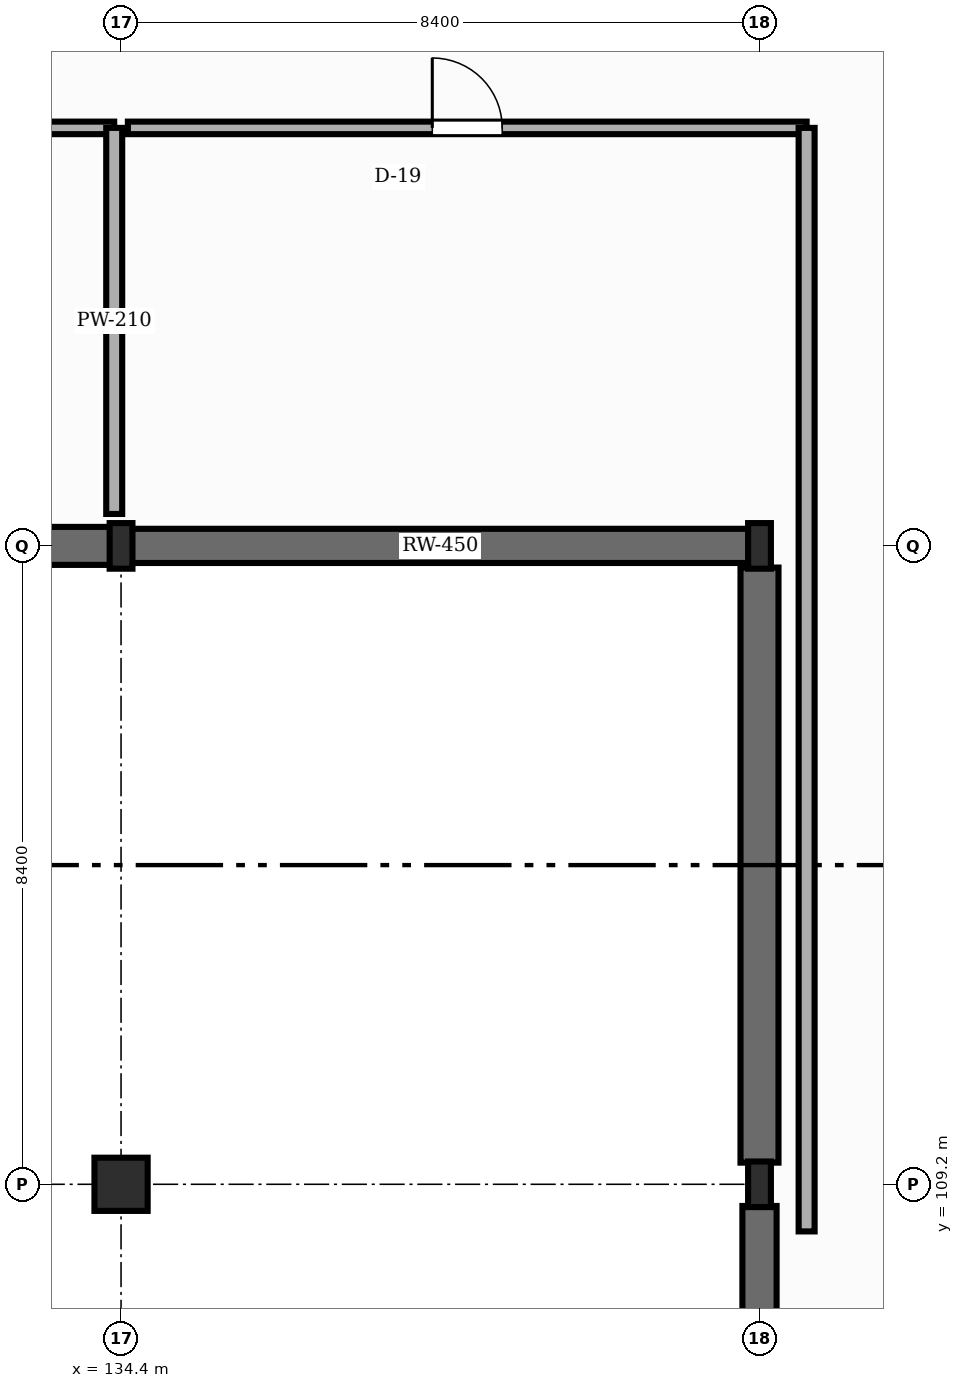
"""IFC4 building model, lengths in metres.
Left out: names, types, materials, properties, quantities, classifications, styles, units other than length and angle.
Written with IfcOpenShell. Run it as: python <this file> out.ifc"""

import sys

from ifc_helpers import new_model, si_unit, direction, frame, frame_2d, origin, origin_2d, place, context, subcontext, project, spatial, rectangle, i_section, extrude, element, fill, save


model = new_model("IFC4")
c1 = context("Model", 3, precision=1e-05, world=origin(), true_north=direction((0.0, 1.0)))
c2 = subcontext(c1, "Body", "Model", "MODEL_VIEW")
j1 = project(units=[si_unit("LENGTHUNIT", "METRE"), si_unit("PLANEANGLEUNIT", "RADIAN")], contexts=[c1])
p1 = place(None, origin())
s1 = spatial("IfcSite", under=j1, at=p1, CompositionType="ELEMENT")
p2 = place(p1, origin())
s2 = spatial("IfcBuilding", under=s1, at=p2, CompositionType="ELEMENT")
p3 = place(p2, frame((0.0, 0.0, -4.5)))
s3 = spatial("IfcBuildingStorey", under=s2, at=p3, CompositionType="ELEMENT", Elevation=-4.5)
p4 = place(p3, frame((134.4, 109.2, 0.0), z_axis=(0.0, 0.0, 1.0), x_axis=(1.0, 0.0, 0.0)))
e1 = element("IfcColumn", 1, at=p4, inside=s3, PredefinedType="COLUMN", context=c2, shape_type="SweptSolid", body=[
    extrude(rectangle(XDim=0.7, YDim=0.7, at=origin_2d()), origin(), (0.0, 0.0, 1.0), 4.5),
])
for number, where, z_axis, x_axis in (
    (2, (134.4, 117.6, 0.0), (0.0, 0.0, 1.0), (1.0, 0.0, 0.0)),
    (3, (142.8, 109.2, 0.0), (0.0, 0.0, 1.0), (1.0, 0.0, 0.0)),
    (4, (142.8, 117.6, 0.0), (0.0, 0.0, 1.0), (1.0, 0.0, 0.0)),
):
    element("IfcColumn", number, at=place(p3, frame(where, z_axis=z_axis, x_axis=x_axis)), inside=s3, PredefinedType="COLUMN", context=c2, shape_type="SweptSolid", body=[
        extrude(i_section(OverallWidth=0.3, OverallDepth=0.6, WebThickness=0.015, FlangeThickness=0.03, FilletRadius=0.027, at=origin_2d()), origin(), (0.0, 0.0, 1.0), 4.5),
    ])
p5 = place(p3, frame((126.008, 117.6, 0.0), z_axis=(0.0, 0.0, 1.0), x_axis=(1.0, 0.0, 0.0)))
e5 = element("IfcWall", 5, at=p5, inside=s3, PredefinedType="USERDEFINED", context=c2, shape_type="SweptSolid", body=[
    extrude(rectangle(XDim=8.384, YDim=0.5, at=frame_2d((4.192, 0.0))), origin(), (0.0, 0.0, 1.0), 4.25),
])
p6 = place(p3, frame((134.408, 117.6, 0.0), z_axis=(0.0, 0.0, 1.0), x_axis=(1.0, 0.0, 0.0)))
e6 = element("IfcWall", 6, at=p6, inside=s3, PredefinedType="USERDEFINED", context=c2, shape_type="SweptSolid", body=[
    extrude(rectangle(XDim=8.384, YDim=0.45, at=frame_2d((4.192, 0.0))), origin(), (0.0, 0.0, 1.0), 4.25),
])
p7 = place(p3, frame((142.8, 117.315, 0.0), z_axis=(0.0, 0.0, 1.0), x_axis=(0.0, -1.0, 0.0)))
e7 = element("IfcWall", 7, at=p7, inside=s3, PredefinedType="USERDEFINED", context=c2, shape_type="SweptSolid", body=[
    extrude(rectangle(XDim=7.83, YDim=0.5, at=frame_2d((3.915, 0.0))), origin(), (0.0, 0.0, 1.0), 4.25),
])
p8 = place(p3, frame((142.8, 108.915, 0.0), z_axis=(0.0, 0.0, 1.0), x_axis=(0.0, -1.0, 0.0)))
e8 = element("IfcWall", 8, at=p8, inside=s3, PredefinedType="USERDEFINED", context=c2, shape_type="SweptSolid", body=[
    extrude(rectangle(XDim=7.83, YDim=0.45, at=frame_2d((3.915, 0.0))), origin(), (0.0, 0.0, 1.0), 4.25),
])
p9 = place(p3, frame((117.69, 123.1, -0.004), z_axis=(0.0, 0.0, 1.0), x_axis=(1.0, 0.0, 0.0)))
e9 = element("IfcWall", 9, at=p9, inside=s3, PredefinedType="STANDARD", context=c2, shape_type="SweptSolid", body=[
    extrude(rectangle(XDim=16.62, YDim=0.165, at=frame_2d((8.31, 0.0))), origin(), (0.0, 0.0, 1.0), 4.254),
])
p10 = place(p9, frame((3.605, 0.0, 0.015)))
e10 = element("IfcOpeningElement", 10, at=p10, cuts=e9, PredefinedType="OPENING", context=c2, shape_type="SweptSolid", body=[
    extrude(rectangle(XDim=1.1, YDim=2.14, at=frame_2d((0.55, 1.07))), frame((0.0, 0.093, 0.0), z_axis=(0.0, -1.0, 0.0), x_axis=(1.0, 0.0, 0.0)), (0.0, 0.0, 1.0), 0.185),
])
p11 = place(p3, frame((134.31, 123.1, -0.004), z_axis=(0.0, 0.0, 1.0), x_axis=(0.0, -1.0, 0.0)))
e11 = element("IfcWall", 11, at=p11, inside=s3, PredefinedType="STANDARD", context=c2, shape_type="SweptSolid", body=[
    extrude(rectangle(XDim=5.08, YDim=0.21, at=frame_2d((2.54, 0.0))), origin(), (0.0, 0.0, 1.0), 3.746),
])
p12 = place(p3, frame((134.49, 123.1, -0.004), z_axis=(0.0, 0.0, 1.0), x_axis=(1.0, 0.0, 0.0)))
e12 = element("IfcWall", 12, at=p12, inside=s3, PredefinedType="STANDARD", context=c2, shape_type="SweptSolid", body=[
    extrude(rectangle(XDim=8.93, YDim=0.165, at=frame_2d((4.465, 0.0))), origin(), (0.0, 0.0, 1.0), 4.254),
])
p13 = place(p12, frame((4.005, 0.0, 0.015)))
e13 = element("IfcOpeningElement", 13, at=p13, cuts=e12, PredefinedType="OPENING", context=c2, shape_type="SweptSolid", body=[
    extrude(rectangle(XDim=0.92, YDim=2.22, at=frame_2d((0.46, 1.11))), frame((0.0, 0.093, 0.0), z_axis=(0.0, -1.0, 0.0), x_axis=(1.0, 0.0, 0.0)), (0.0, 0.0, 1.0), 0.185),
])
p14 = place(p3, frame((143.42, 123.1, -0.004), z_axis=(0.0, 0.0, 1.0), x_axis=(0.0, -1.0, 0.0)))
e14 = element("IfcWall", 14, at=p14, inside=s3, PredefinedType="STANDARD", context=c2, shape_type="SweptSolid", body=[
    extrude(rectangle(XDim=14.52, YDim=0.21, at=frame_2d((7.26, 0.0))), origin(), (0.0, 0.0, 1.0), 4.254),
])
p15 = place(p13, origin())
e15 = element("IfcDoor", 15, at=p15, inside=s3, OperationType="SINGLE_SWING_LEFT", PredefinedType="DOOR", context=c2, shape_type="SweptSolid", body=[
    extrude(rectangle(XDim=0.92, YDim=2.22, at=frame_2d((0.46, 1.11))), frame((0.0, 0.025, 0.0), z_axis=(0.0, -1.0, 0.0), x_axis=(1.0, 0.0, 0.0)), (0.0, 0.0, 1.0), 0.05),
])
fill(e13, e15)
save(model, sys.argv[1])
